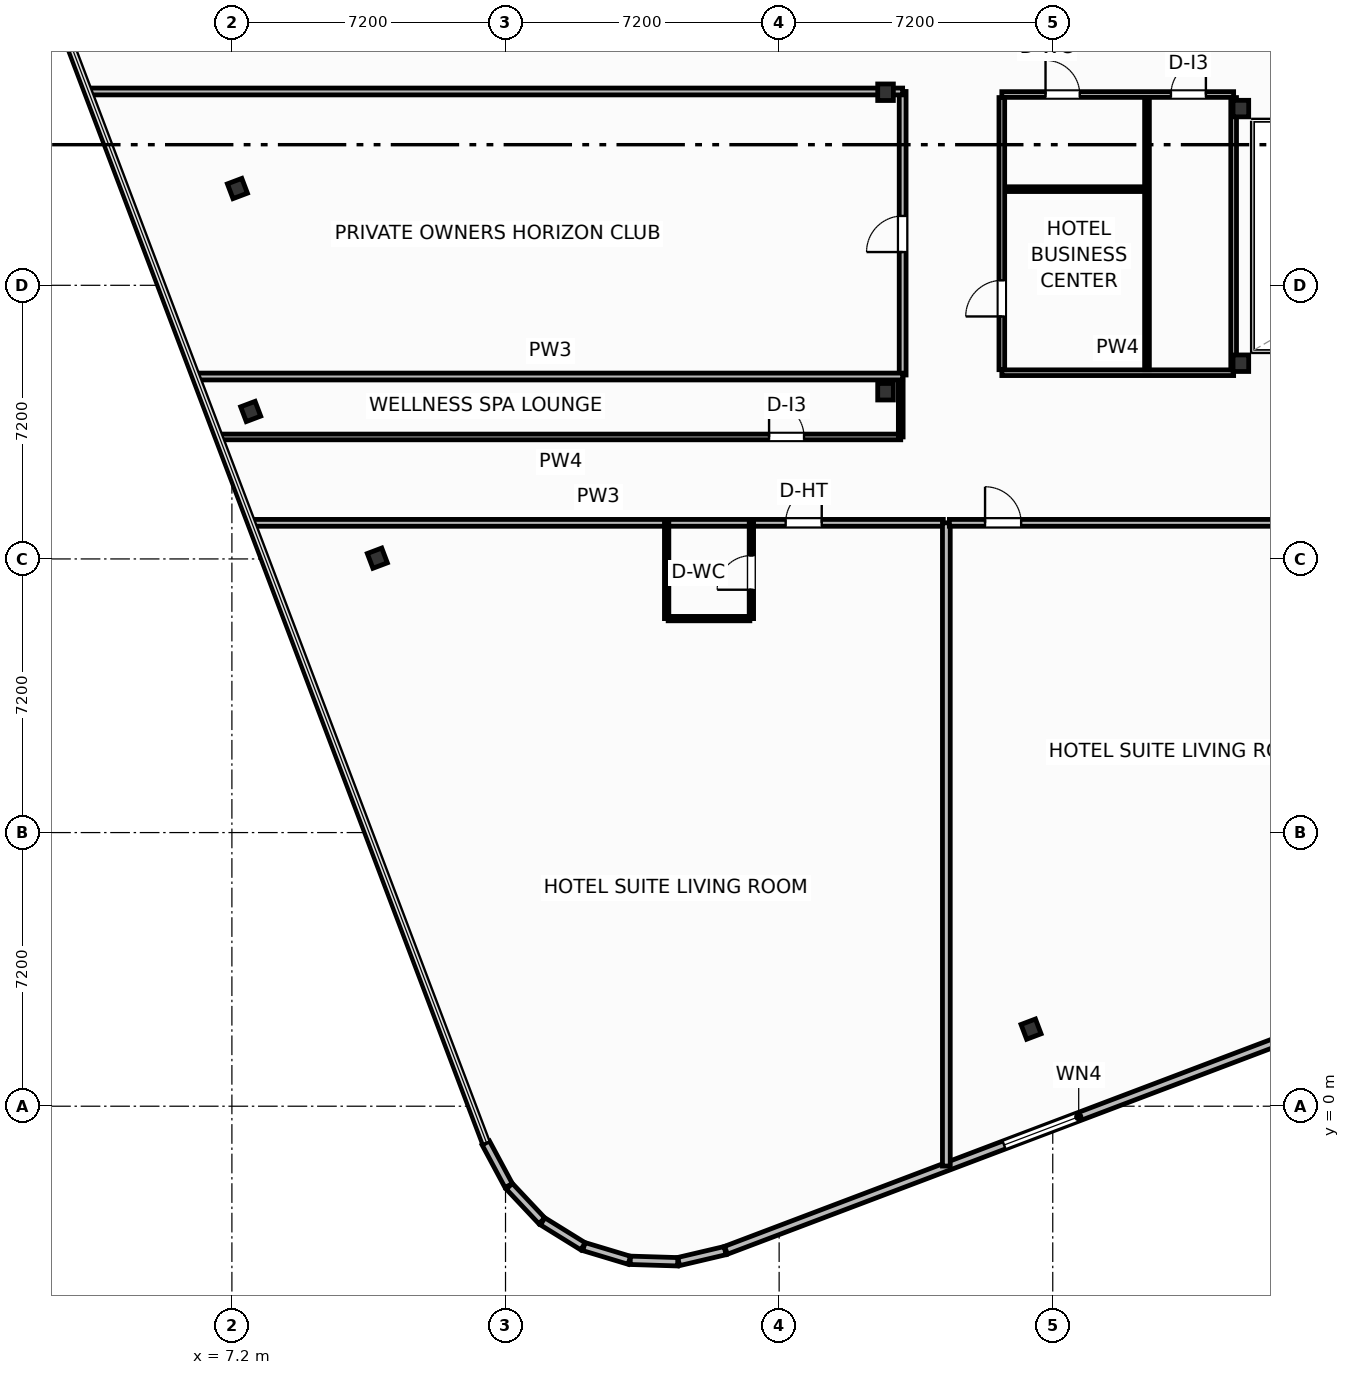
"""IFC4 building model, lengths in metres.
Left out: names, types, materials, properties, quantities, classifications, styles, units other than length and angle.
Written with IfcOpenShell. Run it as: python <this file> out.ifc"""

import sys

from ifc_helpers import new_model, si_unit, direction, frame, frame_2d, origin, origin_2d, place, context, subcontext, project, spatial, rectangle, i_section, extrude, element, fill, save


model = new_model("IFC4")
c1 = context("Model", 3, precision=1e-05, world=origin(), true_north=direction((0.0, 1.0)))
c2 = subcontext(c1, "Body", "Model", "MODEL_VIEW")
j1 = project(units=[si_unit("LENGTHUNIT", "METRE"), si_unit("PLANEANGLEUNIT", "RADIAN")], contexts=[c1])
p1 = place(None, origin())
s1 = spatial("IfcSite", under=j1, at=p1, CompositionType="ELEMENT")
p2 = place(p1, origin())
s2 = spatial("IfcBuilding", under=s1, at=p2, CompositionType="ELEMENT")
p3 = place(p2, frame((0.0, 0.0, 246.0)))
s3 = spatial("IfcBuildingStorey", under=s2, at=p3, CompositionType="ELEMENT", Elevation=246.0)
for number, where, z_axis, x_axis in (
    (1, (33.75, 19.55, 0.0), (0.0, 0.0, 1.0), (1.0, 0.0, 0.0)),
    (2, (33.75, 26.25, 0.0), (0.0, 0.0, 1.0), (1.0, 0.0, 0.0)),
    (3, (24.4, 18.8, 0.0), (0.0, 0.0, 1.0), (1.0, 0.0, 0.0)),
    (4, (24.4, 26.68, 0.0), (0.0, 0.0, 1.0), (1.0, 0.0, 0.0)),
):
    element("IfcColumn", number, at=place(p3, frame(where, z_axis=z_axis, x_axis=x_axis)), inside=s3, PredefinedType="COLUMN", context=c2, shape_type="SweptSolid", body=[
        extrude(i_section(OverallWidth=0.412, OverallDepth=0.435, WebThickness=0.036, FlangeThickness=0.057, FilletRadius=0.025, at=origin_2d()), origin(), (0.0, 0.0, 1.0), 3.7),
    ])
for number, where, z_axis, x_axis in (
    (5, (28.229, 2.028, 0.0), (0.0, 0.0, 1.0), (0.935, 0.354, 0.0)),
    (6, (7.345, 24.146, 0.0), (0.0, 0.0, 1.0), (0.935, 0.354, 0.0)),
    (7, (7.695, 18.281, 0.0), (0.0, 0.0, 1.0), (0.935, 0.354, 0.0)),
    (8, (11.027, 14.42, 0.0), (0.0, 0.0, 1.0), (0.935, 0.354, 0.0)),
):
    element("IfcColumn", number, at=place(p3, frame(where, z_axis=z_axis, x_axis=x_axis)), inside=s3, PredefinedType="COLUMN", context=c2, shape_type="SweptSolid", body=[
        extrude(i_section(OverallWidth=0.406, OverallDepth=0.416, WebThickness=0.03, FlangeThickness=0.048, FilletRadius=0.025, at=origin_2d()), origin(), (0.0, 0.0, 1.0), 3.7),
    ])
p4 = place(p3, frame((13.881, -0.966, 0.0), z_axis=(0.0, 0.0, 1.0), x_axis=(0.473242342135, -0.88093228208, 0.0)))
e9 = element("IfcWall", 9, at=p4, inside=s3, PredefinedType="SOLIDWALL", context=c2, shape_type="SweptSolid", body=[
    extrude(rectangle(XDim=1.274, YDim=0.22, at=frame_2d((0.637, 0.0))), origin(), (0.0, 0.0, 1.0), 2.73),
])
for number, where, z_axis, x_axis in (
    (10, (14.5, -2.106, 0.0), (0.0, 0.0, 1.0), (0.685, -0.729, 0.0)),
    (11, (15.377, -3.029, 0.0), (0.0, 0.0, 1.0), (0.85, -0.526, 0.0)),
    (12, (16.463, -3.694, 0.0), (0.0, 0.0, 1.0), (0.958, -0.288, 0.0)),
):
    element("IfcWall", number, at=place(p3, frame(where, z_axis=z_axis, x_axis=x_axis)), inside=s3, PredefinedType="SOLIDWALL", context=c2, shape_type="SweptSolid", body=[
        extrude(rectangle(XDim=1.249, YDim=0.22, at=frame_2d((0.624, 0.0))), origin(), (0.0, 0.0, 1.0), 2.73),
    ])
p5 = place(p3, frame((17.683, -4.055, 0.0), z_axis=(0.0, 0.0, 1.0), x_axis=(0.999522886512, -0.030886879732, 0.0)))
e13 = element("IfcWall", 13, at=p5, inside=s3, PredefinedType="SOLIDWALL", context=c2, shape_type="SweptSolid", body=[
    extrude(rectangle(XDim=1.249, YDim=0.22, at=frame_2d((0.625, 0.0))), origin(), (0.0, 0.0, 1.0), 2.73),
])
p6 = place(p3, frame((18.956, -4.087, 0.0), z_axis=(0.0, 0.0, 1.0), x_axis=(0.973463008152, 0.228844426981, 0.0)))
e14 = element("IfcWall", 14, at=p6, inside=s3, PredefinedType="SOLIDWALL", context=c2, shape_type="SweptSolid", body=[
    extrude(rectangle(XDim=1.257, YDim=0.22, at=frame_2d((0.628, 0.0))), origin(), (0.0, 0.0, 1.0), 2.73),
])
p7 = place(p3, frame((20.202, -3.791, 0.0), z_axis=(0.0, 0.0, 1.0), x_axis=(0.935225574232, 0.354052432984, 0.0)))
e15 = element("IfcWall", 15, at=p7, inside=s3, PredefinedType="SOLIDWALL", context=c2, shape_type="SweptSolid", body=[
    extrude(rectangle(XDim=17.747, YDim=0.22, at=frame_2d((8.874, 0.0))), origin(), (0.0, 0.0, 1.0), 2.73),
])
p8 = place(p7, frame((7.823, 0.0, 0.8)))
e16 = element("IfcOpeningElement", 16, at=p8, cuts=e15, PredefinedType="OPENING", context=c2, shape_type="SweptSolid", body=[
    extrude(rectangle(XDim=2.1, YDim=1.75, at=frame_2d((1.05, 0.875))), frame((0.0, 0.12, 0.0), z_axis=(0.0, -1.0, 0.0), x_axis=(1.0, 0.0, 0.0)), (0.0, 0.0, 1.0), 0.24),
])
p9 = place(p3, frame((6.908, 17.61, 0.0), z_axis=(0.0, 0.0, 1.0), x_axis=(1.0, 0.0, 0.0)))
e17 = element("IfcWall", 17, at=p9, inside=s3, PredefinedType="PARTITIONING", context=c2, shape_type="SweptSolid", body=[
    extrude(rectangle(XDim=17.892, YDim=0.15, at=frame_2d((8.946, 0.0))), origin(), (0.0, 0.0, 1.0), 3.45),
])
p10 = place(p9, frame((14.427, 0.0, 0.0)))
e18 = element("IfcOpeningElement", 18, at=p10, cuts=e17, PredefinedType="OPENING", context=c2, shape_type="SweptSolid", body=[
    extrude(rectangle(XDim=0.92, YDim=2.05, at=frame_2d((0.46, 1.025))), frame((0.0, 0.085, 0.0), z_axis=(0.0, -1.0, 0.0), x_axis=(1.0, 0.0, 0.0)), (0.0, 0.0, 1.0), 0.17),
])
p11 = place(p3, frame((24.8, 17.61, 0.0), z_axis=(0.0, 0.0, 1.0), x_axis=(0.0, 1.0, 0.0)))
e19 = element("IfcWall", 19, at=p11, inside=s3, PredefinedType="PARTITIONING", context=c2, shape_type="SweptSolid", body=[
    extrude(rectangle(XDim=1.63, YDim=0.125, at=frame_2d((0.815, 0.0))), origin(), (0.0, 0.0, 1.0), 2.739),
])
p12 = place(p3, frame((7.764, 15.35, 0.0), z_axis=(0.0, 0.0, 1.0), x_axis=(1.0, 0.0, 0.0)))
e20 = element("IfcWall", 20, at=p12, inside=s3, PredefinedType="PARTITIONING", context=c2, shape_type="SweptSolid", body=[
    extrude(rectangle(XDim=18.156, YDim=0.18, at=frame_2d((9.078, 0.0))), origin(), (0.0, 0.0, 1.0), 3.45),
])
p13 = place(p12, frame((14.007, 0.0, 0.0)))
e21 = element("IfcOpeningElement", 21, at=p13, cuts=e20, PredefinedType="OPENING", context=c2, shape_type="SweptSolid", body=[
    extrude(rectangle(XDim=0.95, YDim=2.15, at=frame_2d((0.475, 1.075))), frame((0.0, 0.1, 0.0), z_axis=(0.0, -1.0, 0.0), x_axis=(1.0, 0.0, 0.0)), (0.0, 0.0, 1.0), 0.2),
])
p14 = place(p3, frame((18.68, 12.83, 0.0), z_axis=(0.0, 0.0, 1.0), x_axis=(1.0, 0.0, 0.0)))
e22 = element("IfcWall", 22, at=p14, inside=s3, PredefinedType="PARTITIONING", context=c2, shape_type="SweptSolid", body=[
    extrude(rectangle(XDim=2.15, YDim=0.115, at=frame_2d((1.075, 0.0))), origin(), (0.0, 0.0, 1.0), 3.45),
])
p15 = place(p3, frame((20.87, 12.83, 0.0), z_axis=(0.0, 0.0, 1.0), x_axis=(0.0, 1.0, 0.0)))
e23 = element("IfcWall", 23, at=p15, inside=s3, PredefinedType="PARTITIONING", context=c2, shape_type="SweptSolid", body=[
    extrude(rectangle(XDim=2.52, YDim=0.115, at=frame_2d((1.26, 0.0))), origin(), (0.0, 0.0, 1.0), 3.45),
])
p16 = place(p15, frame((0.76, 0.0, 0.0)))
e24 = element("IfcOpeningElement", 24, at=p16, cuts=e23, PredefinedType="OPENING", context=c2, shape_type="SweptSolid", body=[
    extrude(rectangle(XDim=0.9, YDim=2.05, at=frame_2d((0.45, 1.025))), frame((0.0, 0.067, 0.0), z_axis=(0.0, -1.0, 0.0), x_axis=(1.0, 0.0, 0.0)), (0.0, 0.0, 1.0), 0.135),
])
p17 = place(p3, frame((18.64, 12.83, 0.0), z_axis=(0.0, 0.0, 1.0), x_axis=(0.0, 1.0, 0.0)))
e25 = element("IfcWall", 25, at=p17, inside=s3, PredefinedType="PARTITIONING", context=c2, shape_type="SweptSolid", body=[
    extrude(rectangle(XDim=2.52, YDim=0.115, at=frame_2d((1.26, 0.0))), origin(), (0.0, 0.0, 1.0), 3.45),
])
p18 = place(p3, frame((26.0, -1.574, 0.0), z_axis=(0.0, 0.0, 1.0), x_axis=(0.0, 1.0, 0.0)))
e26 = element("IfcWall", 26, at=p18, inside=s3, PredefinedType="PARTITIONING", context=c2, shape_type="SweptSolid", body=[
    extrude(rectangle(XDim=16.925, YDim=0.205, at=frame_2d((8.462, 0.0))), origin(), (0.0, 0.0, 1.0), 2.739),
])
p19 = place(p3, frame((26.08, 15.35, 0.0), z_axis=(0.0, 0.0, 1.0), x_axis=(1.0, 0.0, 0.0)))
e27 = element("IfcWall", 27, at=p19, inside=s3, PredefinedType="PARTITIONING", context=c2, shape_type="SweptSolid", body=[
    extrude(rectangle(XDim=13.84, YDim=0.18, at=frame_2d((6.92, 0.0))), origin(), (0.0, 0.0, 1.0), 3.45),
])
p20 = place(p19, frame((0.939, 0.0, 0.0)))
e28 = element("IfcOpeningElement", 28, at=p20, cuts=e27, PredefinedType="OPENING", context=c2, shape_type="SweptSolid", body=[
    extrude(rectangle(XDim=0.95, YDim=2.15, at=frame_2d((0.475, 1.075))), frame((0.0, 0.1, 0.0), z_axis=(0.0, -1.0, 0.0), x_axis=(1.0, 0.0, 0.0)), (0.0, 0.0, 1.0), 0.2),
])
p21 = place(p3, frame((24.85, 19.24, 0.0), z_axis=(0.0, 0.0, 1.0), x_axis=(0.0, 1.0, 0.0)))
e29 = element("IfcWall", 29, at=p21, inside=s3, PredefinedType="PARTITIONING", context=c2, shape_type="SweptSolid", body=[
    extrude(rectangle(XDim=7.46, YDim=0.18, at=frame_2d((3.73, 0.0))), origin(), (0.0, 0.0, 1.0), 3.45),
])
p22 = place(p21, frame((3.235, 0.0, 0.0)))
e30 = element("IfcOpeningElement", 30, at=p22, cuts=e29, PredefinedType="OPENING", context=c2, shape_type="SweptSolid", body=[
    extrude(rectangle(XDim=0.95, YDim=2.05, at=frame_2d((0.475, 1.025))), frame((0.0, 0.1, 0.0), z_axis=(0.0, -1.0, 0.0), x_axis=(1.0, 0.0, 0.0)), (0.0, 0.0, 1.0), 0.2),
])
p23 = place(p3, frame((6.306, 19.2, 0.0), z_axis=(0.0, 0.0, 1.0), x_axis=(1.0, 0.0, 0.0)))
e31 = element("IfcWall", 31, at=p23, inside=s3, PredefinedType="PARTITIONING", context=c2, shape_type="SweptSolid", body=[
    extrude(rectangle(XDim=18.544, YDim=0.18, at=frame_2d((9.272, 0.0))), origin(), (0.0, 0.0, 1.0), 3.45),
])
p24 = place(p3, frame((3.467, 26.7, 0.0), z_axis=(0.0, 0.0, 1.0), x_axis=(1.0, 0.0, 0.0)))
e32 = element("IfcWall", 32, at=p24, inside=s3, PredefinedType="PARTITIONING", context=c2, shape_type="SweptSolid", body=[
    extrude(rectangle(XDim=21.383, YDim=0.18, at=frame_2d((10.691, 0.0))), origin(), (0.0, 0.0, 1.0), 2.662),
])
p25 = place(p3, frame((27.46, 19.3, 0.0), z_axis=(0.0, 0.0, 1.0), x_axis=(1.0, 0.0, 0.0)))
e33 = element("IfcWall", 33, at=p25, inside=s3, PredefinedType="PARTITIONING", context=c2, shape_type="SweptSolid", body=[
    extrude(rectangle(XDim=6.1, YDim=0.15, at=frame_2d((3.05, 0.0))), origin(), (0.0, 0.0, 1.0), 2.662),
])
p26 = place(p3, frame((27.46, 26.62, 0.0), z_axis=(0.0, 0.0, 1.0), x_axis=(1.0, 0.0, 0.0)))
e34 = element("IfcWall", 34, at=p26, inside=s3, PredefinedType="PARTITIONING", context=c2, shape_type="SweptSolid", body=[
    extrude(rectangle(XDim=6.1, YDim=0.15, at=frame_2d((3.05, 0.0))), origin(), (0.0, 0.0, 1.0), 2.662),
])
p27 = place(p26, frame((1.15, 0.0, 0.0)))
e35 = element("IfcOpeningElement", 35, at=p27, cuts=e34, PredefinedType="OPENING", context=c2, shape_type="SweptSolid", body=[
    extrude(rectangle(XDim=0.9, YDim=2.05, at=frame_2d((0.45, 1.025))), frame((0.0, 0.085, 0.0), z_axis=(0.0, -1.0, 0.0), x_axis=(1.0, 0.0, 0.0)), (0.0, 0.0, 1.0), 0.17),
])
p28 = place(p26, frame((4.45, 0.0, 0.0)))
e36 = element("IfcOpeningElement", 36, at=p28, cuts=e34, PredefinedType="OPENING", context=c2, shape_type="SweptSolid", body=[
    extrude(rectangle(XDim=0.92, YDim=2.05, at=frame_2d((0.46, 1.025))), frame((0.0, 0.085, 0.0), z_axis=(0.0, -1.0, 0.0), x_axis=(1.0, 0.0, 0.0)), (0.0, 0.0, 1.0), 0.17),
])
p29 = place(p3, frame((31.28, 19.38, 0.0), z_axis=(0.0, 0.0, 1.0), x_axis=(0.0, 1.0, 0.0)))
e37 = element("IfcWall", 37, at=p29, inside=s3, PredefinedType="PARTITIONING", context=c2, shape_type="SweptSolid", body=[
    extrude(rectangle(XDim=7.16, YDim=0.125, at=frame_2d((3.58, 0.0))), origin(), (0.0, 0.0, 1.0), 3.45),
])
p30 = place(p3, frame((27.52, 24.13, 0.0), z_axis=(0.0, 0.0, 1.0), x_axis=(1.0, 0.0, 0.0)))
e38 = element("IfcWall", 38, at=p30, inside=s3, PredefinedType="PARTITIONING", context=c2, shape_type="SweptSolid", body=[
    extrude(rectangle(XDim=3.7, YDim=0.125, at=frame_2d((1.85, 0.0))), origin(), (0.0, 0.0, 1.0), 3.45),
])
p31 = place(p3, frame((27.46, 19.38, 0.0), z_axis=(0.0, 0.0, 1.0), x_axis=(0.0, 1.0, 0.0)))
e39 = element("IfcWall", 39, at=p31, inside=s3, PredefinedType="PARTITIONING", context=c2, shape_type="SweptSolid", body=[
    extrude(rectangle(XDim=7.16, YDim=0.15, at=frame_2d((3.58, 0.0))), origin(), (0.0, 0.0, 1.0), 3.45),
])
p32 = place(p31, frame((1.4, 0.0, 0.0)))
e40 = element("IfcOpeningElement", 40, at=p32, cuts=e39, PredefinedType="OPENING", context=c2, shape_type="SweptSolid", body=[
    extrude(rectangle(XDim=0.95, YDim=2.05, at=frame_2d((0.475, 1.025))), frame((0.0, 0.085, 0.0), z_axis=(0.0, -1.0, 0.0), x_axis=(1.0, 0.0, 0.0)), (0.0, 0.0, 1.0), 0.17),
])
p33 = place(p3, frame((33.56, 19.38, 0.0), z_axis=(0.0, 0.0, 1.0), x_axis=(0.0, 1.0, 0.0)))
e41 = element("IfcWall", 41, at=p33, inside=s3, PredefinedType="PARTITIONING", context=c2, shape_type="SweptSolid", body=[
    extrude(rectangle(XDim=7.16, YDim=0.15, at=frame_2d((3.58, 0.0))), origin(), (0.0, 0.0, 1.0), 2.824),
])
p34 = place(p8, origin())
e42 = element("IfcWindow", 42, at=p34, inside=s3, PartitioningType="SINGLE_PANEL", PredefinedType="WINDOW", context=c2, shape_type="SweptSolid", body=[
    extrude(rectangle(XDim=2.1, YDim=1.75, at=frame_2d((1.05, 0.875))), frame((0.0, 0.03, 0.0), z_axis=(0.0, -1.0, 0.0), x_axis=(1.0, 0.0, 0.0)), (0.0, 0.0, 1.0), 0.06),
])
fill(e16, e42)
p35 = place(p10, origin())
e43 = element("IfcDoor", 43, at=p35, inside=s3, OperationType="SINGLE_SWING_LEFT", PredefinedType="DOOR", context=c2, shape_type="SweptSolid", body=[
    extrude(rectangle(XDim=0.92, YDim=2.05, at=frame_2d((0.46, 1.025))), frame((0.0, 0.025, 0.0), z_axis=(0.0, -1.0, 0.0), x_axis=(1.0, 0.0, 0.0)), (0.0, 0.0, 1.0), 0.05),
])
fill(e18, e43)
p36 = place(p13, origin())
e44 = element("IfcDoor", 44, at=p36, inside=s3, OperationType="SINGLE_SWING_RIGHT", PredefinedType="DOOR", context=c2, shape_type="SweptSolid", body=[
    extrude(rectangle(XDim=0.95, YDim=2.15, at=frame_2d((0.475, 1.075))), frame((0.0, 0.025, 0.0), z_axis=(0.0, -1.0, 0.0), x_axis=(1.0, 0.0, 0.0)), (0.0, 0.0, 1.0), 0.05),
])
fill(e21, e44)
p37 = place(p16, origin())
e45 = element("IfcDoor", 45, at=p37, inside=s3, OperationType="SINGLE_SWING_LEFT", PredefinedType="DOOR", context=c2, shape_type="SweptSolid", body=[
    extrude(rectangle(XDim=0.9, YDim=2.05, at=frame_2d((0.45, 1.025))), frame((0.0, 0.025, 0.0), z_axis=(0.0, -1.0, 0.0), x_axis=(1.0, 0.0, 0.0)), (0.0, 0.0, 1.0), 0.05),
])
fill(e24, e45)
p38 = place(p20, origin())
e46 = element("IfcDoor", 46, at=p38, inside=s3, OperationType="SINGLE_SWING_LEFT", PredefinedType="DOOR", context=c2, shape_type="SweptSolid", body=[
    extrude(rectangle(XDim=0.95, YDim=2.15, at=frame_2d((0.475, 1.075))), frame((0.0, 0.025, 0.0), z_axis=(0.0, -1.0, 0.0), x_axis=(1.0, 0.0, 0.0)), (0.0, 0.0, 1.0), 0.05),
])
fill(e28, e46)
p39 = place(p22, origin())
e47 = element("IfcDoor", 47, at=p39, inside=s3, OperationType="SINGLE_SWING_LEFT", PredefinedType="DOOR", context=c2, shape_type="SweptSolid", body=[
    extrude(rectangle(XDim=0.95, YDim=2.05, at=frame_2d((0.475, 1.025))), frame((0.0, 0.025, 0.0), z_axis=(0.0, -1.0, 0.0), x_axis=(1.0, 0.0, 0.0)), (0.0, 0.0, 1.0), 0.05),
])
fill(e30, e47)
p40 = place(p27, origin())
e48 = element("IfcDoor", 48, at=p40, inside=s3, OperationType="SINGLE_SWING_LEFT", PredefinedType="DOOR", context=c2, shape_type="SweptSolid", body=[
    extrude(rectangle(XDim=0.9, YDim=2.05, at=frame_2d((0.45, 1.025))), frame((0.0, 0.025, 0.0), z_axis=(0.0, -1.0, 0.0), x_axis=(1.0, 0.0, 0.0)), (0.0, 0.0, 1.0), 0.05),
])
fill(e35, e48)
p41 = place(p28, origin())
e49 = element("IfcDoor", 49, at=p41, inside=s3, OperationType="SINGLE_SWING_RIGHT", PredefinedType="DOOR", context=c2, shape_type="SweptSolid", body=[
    extrude(rectangle(XDim=0.92, YDim=2.05, at=frame_2d((0.46, 1.025))), frame((0.0, 0.025, 0.0), z_axis=(0.0, -1.0, 0.0), x_axis=(1.0, 0.0, 0.0)), (0.0, 0.0, 1.0), 0.05),
])
fill(e36, e49)
p42 = place(p32, origin())
e50 = element("IfcDoor", 50, at=p42, inside=s3, OperationType="SINGLE_SWING_LEFT", PredefinedType="DOOR", context=c2, shape_type="SweptSolid", body=[
    extrude(rectangle(XDim=0.95, YDim=2.05, at=frame_2d((0.475, 1.025))), frame((0.0, 0.025, 0.0), z_axis=(0.0, -1.0, 0.0), x_axis=(1.0, 0.0, 0.0)), (0.0, 0.0, 1.0), 0.05),
])
fill(e40, e50)
save(model, sys.argv[1])
